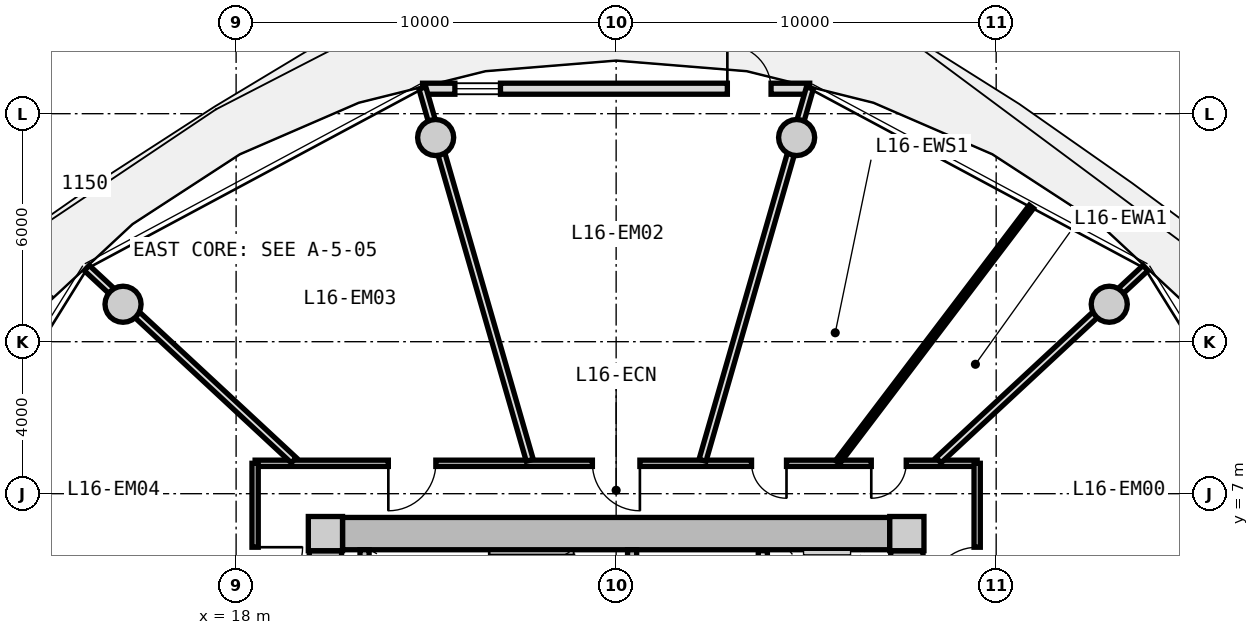
"""IFC4 building model, lengths in metres.
Left out: names, types, materials, properties, quantities, classifications, styles, units other than length and angle.
Written with IfcOpenShell. Run it as: python <this file> out.ifc"""

import sys

from ifc_helpers import new_model, si_unit, direction, frame, frame_2d, origin, origin_2d, place, context, subcontext, project, spatial, rectangle, circle, extrude, source, transform, mapped, element, fill, save


model = new_model("IFC4")
c1 = context("Model", 3, precision=1e-05, world=origin(), true_north=direction((0.0, 1.0)))
c2 = subcontext(c1, "Body", "Model", "MODEL_VIEW")
j1 = project(units=[si_unit("LENGTHUNIT", "METRE"), si_unit("PLANEANGLEUNIT", "RADIAN")], contexts=[c1])
p1 = place(None, origin())
s1 = spatial("IfcSite", under=j1, at=p1, CompositionType="ELEMENT")
p2 = place(p1, origin())
s2 = spatial("IfcBuilding", under=s1, at=p2, CompositionType="ELEMENT")
p3 = place(p2, frame((0.0, 0.0, 55.15)))
s3 = spatial("IfcBuildingStorey", under=s2, at=p3, CompositionType="ELEMENT", Elevation=55.15)
m1 = source(origin(), c2, "Body", "SweptSolid", [
    extrude(rectangle(XDim=0.9, YDim=0.9, at=origin_2d()), origin(), (0.0, 0.0, 1.0), 3.05),
])
for number, where, z_axis, x_axis in (
    (1, (35.65, 5.95, 0.0), (0.0, 0.0, 1.0), (1.0, 0.0, 0.0)),
    (2, (20.35, 5.95, 0.0), (0.0, 0.0, 1.0), (1.0, 0.0, 0.0)),
):
    element("IfcColumn", number, at=place(p3, frame(where, z_axis=z_axis, x_axis=x_axis)), inside=s3, PredefinedType="COLUMN", context=c2, shape_type="MappedRepresentation", body=[
        mapped(m1, transform((0.0, 0.0, 0.0), x_axis=(1.0, 0.0, 0.0), y_axis=(0.0, 1.0, 0.0), z_axis=(0.0, 0.0, 1.0), scale=1.0)),
    ])
m2 = source(origin(), c2, "Body", "SweptSolid", [
    extrude(rectangle(XDim=14.4, YDim=0.85, at=frame_2d((7.2, 0.0))), origin(), (0.0, 0.0, 1.0), 2.79),
])
p4 = place(p3, frame((20.8, 5.95, 0.0), z_axis=(0.0, 0.0, 1.0), x_axis=(1.0, 0.0, 0.0)))
e3 = element("IfcWall", 3, at=p4, inside=s3, PredefinedType="SHEAR", context=c2, shape_type="MappedRepresentation", body=[
    mapped(m2, transform((0.0, 0.0, 0.0), x_axis=(1.0, 0.0, 0.0), y_axis=(0.0, 1.0, 0.0), z_axis=(0.0, 0.0, 1.0), scale=1.0)),
])
m3 = source(origin(), c2, "Body", "SweptSolid", [
    extrude(rectangle(XDim=11.0, YDim=0.85, at=frame_2d((5.5, 0.0))), origin(), (0.0, 0.0, 1.0), 2.79),
])
p5 = place(p3, frame((20.35, -5.5, 0.0), z_axis=(0.0, 0.0, 1.0), x_axis=(0.0, 1.0, 0.0)))
e4 = element("IfcWall", 4, at=p5, inside=s3, PredefinedType="SHEAR", context=c2, shape_type="MappedRepresentation", body=[
    mapped(m3, transform((0.0, 0.0, 0.0), x_axis=(1.0, 0.0, 0.0), y_axis=(0.0, 1.0, 0.0), z_axis=(0.0, 0.0, 1.0), scale=1.0)),
])
p6 = place(p5, frame((3.8, 0.0, 0.0)))
e5 = element("IfcOpeningElement", 5, at=p6, cuts=e4, PredefinedType="OPENING", context=c2, shape_type="SweptSolid", body=[
    extrude(rectangle(XDim=1.2, YDim=2.15, at=frame_2d((0.6, 1.075))), frame((0.0, 0.435, 0.0), z_axis=(0.0, -1.0, 0.0), x_axis=(1.0, 0.0, 0.0)), (0.0, 0.0, 1.0), 0.87),
])
p7 = place(p3, frame((35.65, 5.5, 0.0), z_axis=(0.0, 0.0, 1.0), x_axis=(0.0, -1.0, 0.0)))
e6 = element("IfcWall", 6, at=p7, inside=s3, PredefinedType="SHEAR", context=c2, shape_type="MappedRepresentation", body=[
    mapped(m3, transform((0.0, 0.0, 0.0), x_axis=(1.0, 0.0, 0.0), y_axis=(0.0, 1.0, 0.0), z_axis=(0.0, 0.0, 1.0), scale=1.0)),
])
p8 = place(p7, frame((5.65, 0.0, 0.0)))
e7 = element("IfcOpeningElement", 7, at=p8, cuts=e6, PredefinedType="OPENING", context=c2, shape_type="SweptSolid", body=[
    extrude(rectangle(XDim=1.2, YDim=2.15, at=frame_2d((0.6, 1.075))), frame((0.0, 0.435, 0.0), z_axis=(0.0, -1.0, 0.0), x_axis=(1.0, 0.0, 0.0)), (0.0, 0.0, 1.0), 0.87),
])
p9 = place(p7, frame((9.3, 0.0, 0.0)))
e8 = element("IfcOpeningElement", 8, at=p9, cuts=e6, PredefinedType="OPENING", context=c2, shape_type="SweptSolid", body=[
    extrude(rectangle(XDim=1.0, YDim=2.1, at=frame_2d((0.5, 1.05))), frame((0.0, 0.435, 0.0), z_axis=(0.0, -1.0, 0.0), x_axis=(1.0, 0.0, 0.0)), (0.0, 0.0, 1.0), 0.87),
])
m4 = source(origin(), c2, "Body", "SweptSolid", [
    extrude(circle(Radius=0.475, at=origin_2d()), origin(), (0.0, 0.0, 1.0), 3.05),
])
for number, where, z_axis, x_axis in (
    (9, (40.975, 11.985, 0.0), (0.0, 0.0, 1.0), (1.0, 0.0, 0.0)),
    (10, (32.749, 16.373, 0.0), (0.0, 0.0, 1.0), (1.0, 0.0, 0.0)),
    (11, (23.251, 16.373, 0.0), (0.0, 0.0, 1.0), (1.0, 0.0, 0.0)),
    (12, (15.025, 11.985, 0.0), (0.0, 0.0, 1.0), (1.0, 0.0, 0.0)),
):
    element("IfcColumn", number, at=place(p3, frame(where, z_axis=z_axis, x_axis=x_axis)), inside=s3, PredefinedType="COLUMN", context=c2, shape_type="MappedRepresentation", body=[
        mapped(m4, transform((0.0, 0.0, 0.0), x_axis=(1.0, 0.0, 0.0), y_axis=(0.0, 1.0, 0.0), z_axis=(0.0, 0.0, 1.0), scale=1.0)),
    ])
m5 = source(origin(), c2, "Body", "SweptSolid", [
    extrude(rectangle(XDim=10.187, YDim=0.29, at=frame_2d((5.094, 0.0))), origin(), (0.0, 0.0, 1.0), 2.79),
])
p10 = place(p3, frame((22.906, 17.657, 0.0), z_axis=(0.0, 0.0, 1.0), x_axis=(1.0, 0.0, 0.0)))
e13 = element("IfcWall", 13, at=p10, inside=s3, PredefinedType="SOLIDWALL", context=c2, shape_type="MappedRepresentation", body=[
    mapped(m5, transform((0.0, 0.0, 0.0), x_axis=(1.0, 0.0, 0.0), y_axis=(0.0, 1.0, 0.0), z_axis=(0.0, 0.0, 1.0), scale=1.0)),
])
p11 = place(p10, frame((8.02, 0.0, 0.0)))
e14 = element("IfcOpeningElement", 14, at=p11, cuts=e13, PredefinedType="OPENING", context=c2, shape_type="SweptSolid", body=[
    extrude(rectangle(XDim=1.15, YDim=2.25, at=frame_2d((0.575, 1.125))), frame((0.0, 0.155, 0.0), z_axis=(0.0, -1.0, 0.0), x_axis=(1.0, 0.0, 0.0)), (0.0, 0.0, 1.0), 0.31),
])
p12 = place(p10, frame((0.85, 0.0, 0.85)))
e15 = element("IfcOpeningElement", 15, at=p12, cuts=e13, PredefinedType="OPENING", context=c2, shape_type="SweptSolid", body=[
    extrude(rectangle(XDim=1.2, YDim=1.5, at=frame_2d((0.6, 0.75))), frame((0.0, 0.155, 0.0), z_axis=(0.0, -1.0, 0.0), x_axis=(1.0, 0.0, 0.0)), (0.0, 0.0, 1.0), 0.31),
])
m6 = source(origin(), c2, "Body", "SweptSolid", [
    extrude(rectangle(XDim=3.075, YDim=0.24, at=frame_2d((1.538, 0.0))), origin(), (0.0, 0.0, 1.0), 2.79),
])
p13 = place(p3, frame((21.38, 2.45, 0.0), z_axis=(0.0, 0.0, 1.0), x_axis=(0.0, 1.0, 0.0)))
e16 = element("IfcWall", 16, at=p13, inside=s3, PredefinedType="PARTITIONING", context=c2, shape_type="MappedRepresentation", body=[
    mapped(m6, transform((0.0, 0.0, 0.0), x_axis=(1.0, 0.0, 0.0), y_axis=(0.0, 1.0, 0.0), z_axis=(0.0, 0.0, 1.0), scale=1.0)),
])
p14 = place(p3, frame((28.42, 2.45, 0.0), z_axis=(0.0, 0.0, 1.0), x_axis=(0.0, 1.0, 0.0)))
e17 = element("IfcWall", 17, at=p14, inside=s3, PredefinedType="PARTITIONING", context=c2, shape_type="MappedRepresentation", body=[
    mapped(m6, transform((0.0, 0.0, 0.0), x_axis=(1.0, 0.0, 0.0), y_axis=(0.0, 1.0, 0.0), z_axis=(0.0, 0.0, 1.0), scale=1.0)),
])
p15 = place(p14, frame((0.55, 0.0, 0.0)))
e18 = element("IfcOpeningElement", 18, at=p15, cuts=e17, PredefinedType="OPENING", context=c2, shape_type="SweptSolid", body=[
    extrude(rectangle(XDim=1.1, YDim=2.15, at=frame_2d((0.55, 1.075))), frame((0.0, 0.13, 0.0), z_axis=(0.0, -1.0, 0.0), x_axis=(1.0, 0.0, 0.0)), (0.0, 0.0, 1.0), 0.26),
])
m7 = source(origin(), c2, "Body", "SweptSolid", [
    extrude(rectangle(XDim=5.0, YDim=0.24, at=frame_2d((2.5, 0.0))), origin(), (0.0, 0.0, 1.0), 2.775),
])
p16 = place(p3, frame((31.86, 0.5, 0.0), z_axis=(0.0, 0.0, 1.0), x_axis=(0.0, 1.0, 0.0)))
e19 = element("IfcWall", 19, at=p16, inside=s3, PredefinedType="PARTITIONING", context=c2, shape_type="MappedRepresentation", body=[
    mapped(m7, transform((0.0, 0.0, 0.0), x_axis=(1.0, 0.0, 0.0), y_axis=(0.0, 1.0, 0.0), z_axis=(0.0, 0.0, 1.0), scale=1.0)),
])
p17 = place(p16, frame((3.05, 0.0, 0.0)))
e20 = element("IfcOpeningElement", 20, at=p17, cuts=e19, PredefinedType="OPENING", context=c2, shape_type="SweptSolid", body=[
    extrude(rectangle(XDim=1.3, YDim=2.2, at=frame_2d((0.65, 1.1))), frame((0.0, 0.13, 0.0), z_axis=(0.0, -1.0, 0.0), x_axis=(1.0, 0.0, 0.0)), (0.0, 0.0, 1.0), 0.26),
])
p18 = place(p16, frame((0.55, 0.0, 0.0)))
e21 = element("IfcOpeningElement", 21, at=p18, cuts=e19, PredefinedType="OPENING", context=c2, shape_type="SweptSolid", body=[
    extrude(rectangle(XDim=1.3, YDim=2.2, at=frame_2d((0.65, 1.1))), frame((0.0, 0.13, 0.0), z_axis=(0.0, -1.0, 0.0), x_axis=(1.0, 0.0, 0.0)), (0.0, 0.0, 1.0), 0.26),
])
m8 = source(origin(), c2, "Body", "SweptSolid", [
    extrude(rectangle(XDim=19.0, YDim=0.165, at=frame_2d((9.5, 0.0))), origin(), (0.0, 0.0, 1.0), 2.775),
])
p19 = place(p3, frame((18.5, 7.8, 0.0), z_axis=(0.0, 0.0, 1.0), x_axis=(1.0, 0.0, 0.0)))
e22 = element("IfcWall", 22, at=p19, inside=s3, PredefinedType="PARTITIONING", context=c2, shape_type="MappedRepresentation", body=[
    mapped(m8, transform((0.0, 0.0, 0.0), x_axis=(1.0, 0.0, 0.0), y_axis=(0.0, 1.0, 0.0), z_axis=(0.0, 0.0, 1.0), scale=1.0)),
])
p20 = place(p19, frame((16.214, 0.0, 0.0)))
e23 = element("IfcOpeningElement", 23, at=p20, cuts=e22, PredefinedType="OPENING", context=c2, shape_type="SweptSolid", body=[
    extrude(rectangle(XDim=0.92, YDim=2.1, at=frame_2d((0.46, 1.05))), frame((0.0, 0.093, 0.0), z_axis=(0.0, -1.0, 0.0), x_axis=(1.0, 0.0, 0.0)), (0.0, 0.0, 1.0), 0.185),
])
p21 = place(p19, frame((13.063, 0.0, 0.0)))
e24 = element("IfcOpeningElement", 24, at=p21, cuts=e22, PredefinedType="OPENING", context=c2, shape_type="SweptSolid", body=[
    extrude(rectangle(XDim=0.92, YDim=2.1, at=frame_2d((0.46, 1.05))), frame((0.0, 0.093, 0.0), z_axis=(0.0, -1.0, 0.0), x_axis=(1.0, 0.0, 0.0)), (0.0, 0.0, 1.0), 0.185),
])
p22 = place(p19, frame((8.875, 0.0, 0.0)))
e25 = element("IfcOpeningElement", 25, at=p22, cuts=e22, PredefinedType="OPENING", context=c2, shape_type="SweptSolid", body=[
    extrude(rectangle(XDim=1.25, YDim=2.2, at=frame_2d((0.625, 1.1))), frame((0.0, 0.093, 0.0), z_axis=(0.0, -1.0, 0.0), x_axis=(1.0, 0.0, 0.0)), (0.0, 0.0, 1.0), 0.185),
])
p23 = place(p19, frame((3.506, 0.0, 0.0)))
e26 = element("IfcOpeningElement", 26, at=p23, cuts=e22, PredefinedType="OPENING", context=c2, shape_type="SweptSolid", body=[
    extrude(rectangle(XDim=1.25, YDim=2.2, at=frame_2d((0.625, 1.1))), frame((0.0, 0.093, 0.0), z_axis=(0.0, -1.0, 0.0), x_axis=(1.0, 0.0, 0.0)), (0.0, 0.0, 1.0), 0.185),
])
m9 = source(origin(), c2, "Body", "SweptSolid", [
    extrude(rectangle(XDim=15.6, YDim=0.165, at=frame_2d((7.8, 0.0))), origin(), (0.0, 0.0, 1.0), 2.775),
])
p24 = place(p3, frame((18.5, -7.8, 0.0), z_axis=(0.0, 0.0, 1.0), x_axis=(0.0, 1.0, 0.0)))
e27 = element("IfcWall", 27, at=p24, inside=s3, PredefinedType="PARTITIONING", context=c2, shape_type="MappedRepresentation", body=[
    mapped(m9, transform((0.0, 0.0, 0.0), x_axis=(1.0, 0.0, 0.0), y_axis=(0.0, 1.0, 0.0), z_axis=(0.0, 0.0, 1.0), scale=1.0)),
])
p25 = place(p24, frame((12.141, 0.0, 0.0)))
e28 = element("IfcOpeningElement", 28, at=p25, cuts=e27, PredefinedType="OPENING", context=c2, shape_type="SweptSolid", body=[
    extrude(rectangle(XDim=1.25, YDim=2.2, at=frame_2d((0.625, 1.1))), frame((0.0, 0.093, 0.0), z_axis=(0.0, -1.0, 0.0), x_axis=(1.0, 0.0, 0.0)), (0.0, 0.0, 1.0), 0.185),
])
p26 = place(p24, frame((7.175, 0.0, 0.0)))
e29 = element("IfcOpeningElement", 29, at=p26, cuts=e27, PredefinedType="OPENING", context=c2, shape_type="SweptSolid", body=[
    extrude(rectangle(XDim=1.25, YDim=2.2, at=frame_2d((0.625, 1.1))), frame((0.0, 0.093, 0.0), z_axis=(0.0, -1.0, 0.0), x_axis=(1.0, 0.0, 0.0)), (0.0, 0.0, 1.0), 0.185),
])
p27 = place(p24, frame((2.208, 0.0, 0.0)))
e30 = element("IfcOpeningElement", 30, at=p27, cuts=e27, PredefinedType="OPENING", context=c2, shape_type="SweptSolid", body=[
    extrude(rectangle(XDim=1.25, YDim=2.2, at=frame_2d((0.625, 1.1))), frame((0.0, 0.093, 0.0), z_axis=(0.0, -1.0, 0.0), x_axis=(1.0, 0.0, 0.0)), (0.0, 0.0, 1.0), 0.185),
])
p28 = place(p3, frame((37.5, 7.8, 0.0), z_axis=(0.0, 0.0, 1.0), x_axis=(0.0, -1.0, 0.0)))
e31 = element("IfcWall", 31, at=p28, inside=s3, PredefinedType="PARTITIONING", context=c2, shape_type="MappedRepresentation", body=[
    mapped(m9, transform((0.0, 0.0, 0.0), x_axis=(1.0, 0.0, 0.0), y_axis=(0.0, 1.0, 0.0), z_axis=(0.0, 0.0, 1.0), scale=1.0)),
])
p29 = place(p28, frame((8.835, 0.0, 0.0)))
e32 = element("IfcOpeningElement", 32, at=p29, cuts=e31, PredefinedType="OPENING", context=c2, shape_type="SweptSolid", body=[
    extrude(rectangle(XDim=1.05, YDim=2.15, at=frame_2d((0.525, 1.075))), frame((0.0, 0.093, 0.0), z_axis=(0.0, -1.0, 0.0), x_axis=(1.0, 0.0, 0.0)), (0.0, 0.0, 1.0), 0.185),
])
p30 = place(p28, frame((2.208, 0.0, 0.0)))
e33 = element("IfcOpeningElement", 33, at=p30, cuts=e31, PredefinedType="OPENING", context=c2, shape_type="SweptSolid", body=[
    extrude(rectangle(XDim=1.25, YDim=2.2, at=frame_2d((0.625, 1.1))), frame((0.0, 0.093, 0.0), z_axis=(0.0, -1.0, 0.0), x_axis=(1.0, 0.0, 0.0)), (0.0, 0.0, 1.0), 0.185),
])
m10 = source(origin(), c2, "Body", "SweptSolid", [
    extrude(rectangle(XDim=7.435, YDim=0.19, at=frame_2d((3.717, 0.0))), origin(), (0.0, 0.0, 1.0), 2.225),
])
for number, where, z_axis, x_axis in (
    (34, (19.517, 7.88, 0.0), (0.0, 0.0, 1.0), (-0.733, 0.681, 0.0)),
    (35, (36.483, 7.88, 0.0), (0.0, 0.0, 1.0), (0.733, 0.681, 0.0)),
):
    element("IfcWall", number, at=place(p3, frame(where, z_axis=z_axis, x_axis=x_axis)), inside=s3, PredefinedType="PARTITIONING", context=c2, shape_type="MappedRepresentation", body=[
        mapped(m10, transform((0.0, 0.0, 0.0), x_axis=(1.0, 0.0, 0.0), y_axis=(0.0, 1.0, 0.0), z_axis=(0.0, 0.0, 1.0), scale=1.0)),
    ])
m11 = source(origin(), c2, "Body", "SweptSolid", [
    extrude(rectangle(XDim=10.196, YDim=0.19, at=frame_2d((5.098, 0.0))), origin(), (0.0, 0.0, 1.0), 2.415),
])
p31 = place(p3, frame((30.273, 7.88, 0.0), z_axis=(0.0, 0.0, 1.0), x_axis=(0.277136420347, 0.960830580549, 0.0)))
e36 = element("IfcWall", 36, at=p31, inside=s3, PredefinedType="PARTITIONING", context=c2, shape_type="MappedRepresentation", body=[
    mapped(m11, transform((0.0, 0.0, 0.0), x_axis=(1.0, 0.0, 0.0), y_axis=(0.0, 1.0, 0.0), z_axis=(0.0, 0.0, 1.0), scale=1.0)),
])
m12 = source(origin(), c2, "Body", "SweptSolid", [
    extrude(rectangle(XDim=8.436, YDim=0.14, at=frame_2d((4.218, 0.0))), origin(), (0.0, 0.0, 1.0), 2.775),
])
p32 = place(p3, frame((33.828, 7.83, 0.0), z_axis=(0.0, 0.0, 1.0), x_axis=(0.604486552388, 0.796615345058, 0.0)))
e37 = element("IfcWall", 37, at=p32, inside=s3, PredefinedType="PARTITIONING", context=c2, shape_type="MappedRepresentation", body=[
    mapped(m12, transform((0.0, 0.0, 0.0), x_axis=(1.0, 0.0, 0.0), y_axis=(0.0, 1.0, 0.0), z_axis=(0.0, 0.0, 1.0), scale=1.0)),
])
m13 = source(origin(), c2, "Body", "SweptSolid", [
    extrude(rectangle(XDim=10.196, YDim=0.19, at=frame_2d((5.098, 0.0))), origin(), (0.0, 0.0, 1.0), 2.225),
])
p33 = place(p3, frame((25.727, 7.88, 0.0), z_axis=(0.0, 0.0, 1.0), x_axis=(-0.277136420347, 0.960830580549, 0.0)))
e38 = element("IfcWall", 38, at=p33, inside=s3, PredefinedType="PARTITIONING", context=c2, shape_type="MappedRepresentation", body=[
    mapped(m13, transform((0.0, 0.0, 0.0), x_axis=(1.0, 0.0, 0.0), y_axis=(0.0, 1.0, 0.0), z_axis=(0.0, 0.0, 1.0), scale=1.0)),
])
m14 = source(origin(), c2, "Body", "SweptSolid", [
    extrude(rectangle(XDim=1.15, YDim=2.25, at=frame_2d((0.575, 1.125))), frame((0.0, 0.025, 0.0), z_axis=(0.0, -1.0, 0.0), x_axis=(1.0, 0.0, 0.0)), (0.0, 0.0, 1.0), 0.05),
])
p34 = place(p11, origin())
e39 = element("IfcDoor", 39, at=p34, inside=s3, OperationType="SINGLE_SWING_LEFT", PredefinedType="DOOR", context=c2, shape_type="MappedRepresentation", body=[
    mapped(m14, transform((0.0, 0.0, 0.0), x_axis=(1.0, 0.0, 0.0), y_axis=(0.0, 1.0, 0.0), z_axis=(0.0, 0.0, 1.0), scale=1.0)),
])
fill(e14, e39)
m15 = source(origin(), c2, "Body", "SweptSolid", [
    extrude(rectangle(XDim=1.2, YDim=1.5, at=frame_2d((0.6, 0.75))), frame((0.0, 0.03, 0.0), z_axis=(0.0, -1.0, 0.0), x_axis=(1.0, 0.0, 0.0)), (0.0, 0.0, 1.0), 0.06),
])
p35 = place(p12, origin())
e40 = element("IfcWindow", 40, at=p35, inside=s3, PartitioningType="SINGLE_PANEL", PredefinedType="WINDOW", context=c2, shape_type="MappedRepresentation", body=[
    mapped(m15, transform((0.0, 0.0, 0.0), x_axis=(1.0, 0.0, 0.0), y_axis=(0.0, 1.0, 0.0), z_axis=(0.0, 0.0, 1.0), scale=1.0)),
])
fill(e15, e40)
m16 = source(origin(), c2, "Body", "SweptSolid", [
    extrude(rectangle(XDim=1.25, YDim=2.2, at=frame_2d((0.625, 1.1))), frame((0.0, 0.025, 0.0), z_axis=(0.0, -1.0, 0.0), x_axis=(1.0, 0.0, 0.0)), (0.0, 0.0, 1.0), 0.05),
])
p36 = place(p25, frame((1.25, 0.0, 0.0), z_axis=(0.0, 0.0, 1.0), x_axis=(-1.0, 0.0, 0.0)))
e41 = element("IfcDoor", 41, at=p36, inside=s3, OperationType="SINGLE_SWING_LEFT", PredefinedType="DOOR", context=c2, shape_type="MappedRepresentation", body=[
    mapped(m16, transform((0.0, 0.0, 0.0), x_axis=(1.0, 0.0, 0.0), y_axis=(0.0, 1.0, 0.0), z_axis=(0.0, 0.0, 1.0), scale=1.0)),
])
fill(e28, e41)
p37 = place(p30, frame((1.25, 0.0, 0.0), z_axis=(0.0, 0.0, 1.0), x_axis=(-1.0, 0.0, 0.0)))
e42 = element("IfcDoor", 42, at=p37, inside=s3, OperationType="SINGLE_SWING_LEFT", PredefinedType="DOOR", context=c2, shape_type="MappedRepresentation", body=[
    mapped(m16, transform((0.0, 0.0, 0.0), x_axis=(1.0, 0.0, 0.0), y_axis=(0.0, 1.0, 0.0), z_axis=(0.0, 0.0, 1.0), scale=1.0)),
])
fill(e33, e42)
m17 = source(origin(), c2, "Body", "SweptSolid", [
    extrude(rectangle(XDim=0.92, YDim=2.1, at=frame_2d((0.46, 1.05))), frame((0.0, 0.025, 0.0), z_axis=(0.0, -1.0, 0.0), x_axis=(1.0, 0.0, 0.0)), (0.0, 0.0, 1.0), 0.05),
])
p38 = place(p20, frame((0.92, 0.0, 0.0), z_axis=(0.0, 0.0, 1.0), x_axis=(-1.0, 0.0, 0.0)))
e43 = element("IfcDoor", 43, at=p38, inside=s3, OperationType="SINGLE_SWING_RIGHT", PredefinedType="DOOR", context=c2, shape_type="MappedRepresentation", body=[
    mapped(m17, transform((0.0, 0.0, 0.0), x_axis=(1.0, 0.0, 0.0), y_axis=(0.0, 1.0, 0.0), z_axis=(0.0, 0.0, 1.0), scale=1.0)),
])
fill(e23, e43)
p39 = place(p21, frame((0.92, 0.0, 0.0), z_axis=(0.0, 0.0, 1.0), x_axis=(-1.0, 0.0, 0.0)))
e44 = element("IfcDoor", 44, at=p39, inside=s3, OperationType="SINGLE_SWING_LEFT", PredefinedType="DOOR", context=c2, shape_type="MappedRepresentation", body=[
    mapped(m17, transform((0.0, 0.0, 0.0), x_axis=(1.0, 0.0, 0.0), y_axis=(0.0, 1.0, 0.0), z_axis=(0.0, 0.0, 1.0), scale=1.0)),
])
fill(e24, e44)
p40 = place(p22, frame((1.25, 0.0, 0.0), z_axis=(0.0, 0.0, 1.0), x_axis=(-1.0, 0.0, 0.0)))
e45 = element("IfcDoor", 45, at=p40, inside=s3, OperationType="SINGLE_SWING_LEFT", PredefinedType="DOOR", context=c2, shape_type="MappedRepresentation", body=[
    mapped(m16, transform((0.0, 0.0, 0.0), x_axis=(1.0, 0.0, 0.0), y_axis=(0.0, 1.0, 0.0), z_axis=(0.0, 0.0, 1.0), scale=1.0)),
])
fill(e25, e45)
p41 = place(p23, frame((1.25, 0.0, 0.0), z_axis=(0.0, 0.0, 1.0), x_axis=(-1.0, 0.0, 0.0)))
e46 = element("IfcDoor", 46, at=p41, inside=s3, OperationType="SINGLE_SWING_RIGHT", PredefinedType="DOOR", context=c2, shape_type="MappedRepresentation", body=[
    mapped(m16, transform((0.0, 0.0, 0.0), x_axis=(1.0, 0.0, 0.0), y_axis=(0.0, 1.0, 0.0), z_axis=(0.0, 0.0, 1.0), scale=1.0)),
])
fill(e26, e46)
save(model, sys.argv[1])
